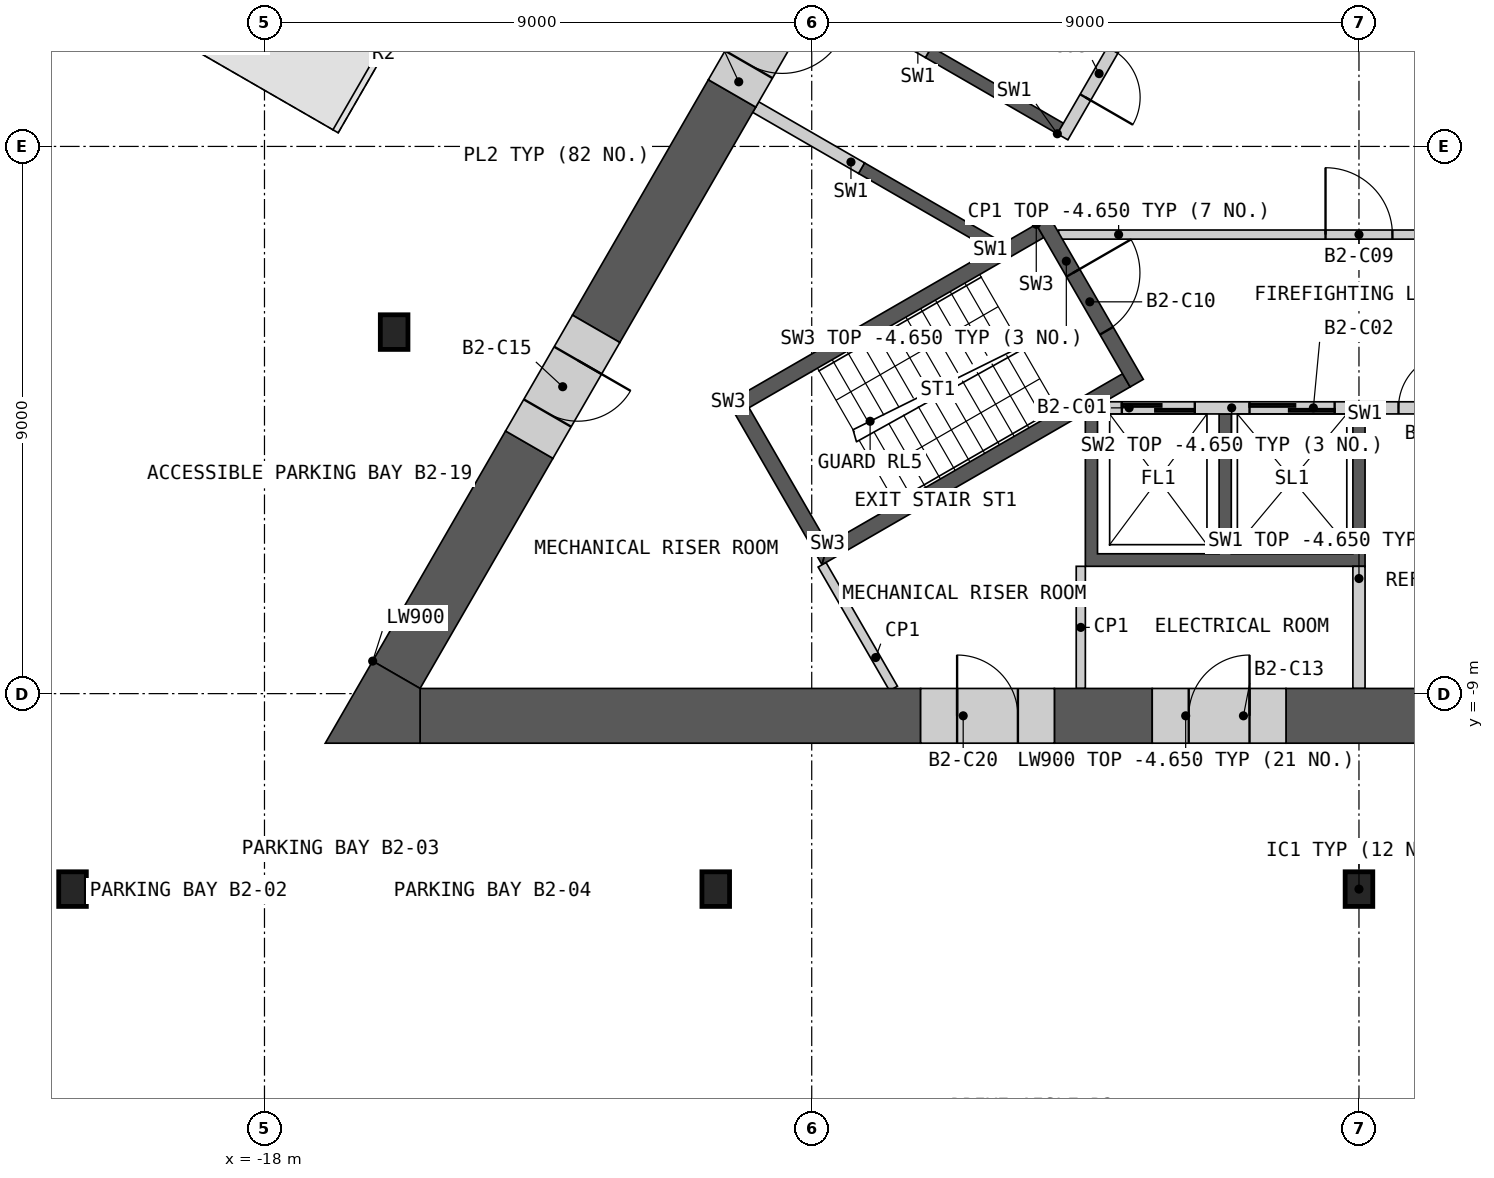
"""IFC4 building model, lengths in metres.
Left out: names, types, materials, properties, quantities, classifications, styles, units other than length and angle.
Written with IfcOpenShell. Run it as: python <this file> out.ifc"""

import sys

from ifc_helpers import new_model, si_unit, direction, frame, frame_2d, origin, origin_2d, place, context, subcontext, project, spatial, polyline, rectangle, i_section, outline, extrude, element, fill, save


model = new_model("IFC4")
c1 = context("Model", 3, precision=1e-05, world=origin(), true_north=direction((0.0, 1.0)))
c2 = subcontext(c1, "Body", "Model", "MODEL_VIEW")
j1 = project(units=[si_unit("LENGTHUNIT", "METRE"), si_unit("PLANEANGLEUNIT", "RADIAN")], contexts=[c1])
p1 = place(None, origin())
s1 = spatial("IfcSite", under=j1, at=p1, CompositionType="ELEMENT")
p2 = place(p1, origin())
s2 = spatial("IfcBuilding", under=s1, at=p2, CompositionType="ELEMENT")
p3 = place(p2, frame((0.0, 0.0, -8.4)))
s3 = spatial("IfcBuildingStorey", under=s2, at=p3, CompositionType="ELEMENT", Elevation=-8.4)
p4 = place(p3, frame((-6.74, 32.759, 0.0), z_axis=(0.0, 0.0, 1.0), x_axis=(-0.500000005698, -0.866025400495, 0.0)))
e1 = element("IfcWall", 1, at=p4, inside=s3, PredefinedType="SOLIDWALL", context=c2, shape_type="SweptSolid", body=[
    extrude(rectangle(XDim=50.0, YDim=0.6, at=frame_2d((25.0, 0.0))), origin(), (0.0, 0.0, 1.0), 3.75),
])
for number, where, z_axis, x_axis in (
    (2, (-15.868, -3.054, 0.0), (0.0, 0.0, 1.0), (1.0, 0.0, 0.0)),
    (3, (-21.157, -12.215, 0.0), (0.0, 0.0, 1.0), (1.0, 0.0, 0.0)),
    (4, (-10.578, -12.215, 0.0), (0.0, 0.0, 1.0), (1.0, 0.0, 0.0)),
    (5, (0.0, -12.215, 0.0), (0.0, 0.0, 1.0), (1.0, 0.0, 0.0)),
):
    element("IfcColumn", number, at=place(p3, frame(where, z_axis=z_axis, x_axis=x_axis)), inside=s3, PredefinedType="COLUMN", context=c2, shape_type="SweptSolid", body=[
        extrude(i_section(OverallWidth=0.454, OverallDepth=0.57, WebThickness=0.078, FlangeThickness=0.125, at=origin_2d()), origin(), (0.0, 0.0, 1.0), 4.2),
    ])
p5 = place(p3, origin())
e6 = element("IfcWall", 6, at=p5, inside=s3, PredefinedType="SHEAR", context=c2, shape_type="SweptSolid", body=[
    extrude(outline(polyline([(0.1, -4.4), (0.1, -6.906), (-4.5, -6.906), (-4.5, -4.4), (-4.3, -4.4), (-4.3, -6.7), (-2.3, -6.7), (-2.3, -4.4), (-2.1, -4.4), (-2.1, -6.7), (-0.1, -6.7), (-0.1, -4.4), (0.1, -4.4)])), origin(), (0.0, 0.0, 1.0), 3.75),
])
p6 = place(p3, frame((-4.187, -4.3, 0.0), z_axis=(0.0, 0.0, 1.0), x_axis=(1.0, 0.0, 0.0)))
e7 = element("IfcWall", 7, at=p6, inside=s3, PredefinedType="SOLIDWALL", context=c2, shape_type="SweptSolid", body=[
    extrude(rectangle(XDim=8.373, YDim=0.2, at=frame_2d((4.187, 0.0))), origin(), (0.0, 0.0, 1.0), 3.75),
])
p7 = place(p6, frame((0.287, 0.0, 0.0)))
e8 = element("IfcOpeningElement", 8, at=p7, cuts=e7, PredefinedType="OPENING", context=c2, shape_type="SweptSolid", body=[
    extrude(rectangle(XDim=1.2, YDim=2.1, at=frame_2d((0.6, 1.05))), frame((0.0, 0.11, 0.0), z_axis=(0.0, -1.0, 0.0), x_axis=(1.0, 0.0, 0.0)), (0.0, 0.0, 1.0), 0.22),
])
p8 = place(p6, frame((2.387, 0.0, 0.0)))
e9 = element("IfcOpeningElement", 9, at=p8, cuts=e7, PredefinedType="OPENING", context=c2, shape_type="SweptSolid", body=[
    extrude(rectangle(XDim=1.4, YDim=2.1, at=frame_2d((0.7, 1.05))), frame((0.0, 0.11, 0.0), z_axis=(0.0, -1.0, 0.0), x_axis=(1.0, 0.0, 0.0)), (0.0, 0.0, 1.0), 0.22),
])
p9 = place(p6, frame((4.837, 0.0, 0.0)))
e10 = element("IfcOpeningElement", 10, at=p9, cuts=e7, PredefinedType="OPENING", context=c2, shape_type="SweptSolid", body=[
    extrude(rectangle(XDim=0.9, YDim=2.1, at=frame_2d((0.45, 1.05))), frame((0.0, 0.11, 0.0), z_axis=(0.0, -1.0, 0.0), x_axis=(1.0, 0.0, 0.0)), (0.0, 0.0, 1.0), 0.22),
])
p10 = place(p6, frame((6.887, 0.0, 0.0)))
e11 = element("IfcOpeningElement", 11, at=p10, cuts=e7, PredefinedType="OPENING", context=c2, shape_type="SweptSolid", body=[
    extrude(rectangle(XDim=1.2, YDim=2.1, at=frame_2d((0.6, 1.05))), frame((0.0, 0.11, 0.0), z_axis=(0.0, -1.0, 0.0), x_axis=(1.0, 0.0, 0.0)), (0.0, 0.0, 1.0), 0.22),
])
p11 = place(p3, frame((0.0, -6.906, 0.0), z_axis=(0.0, 0.0, 1.0), x_axis=(0.0, -1.0, 0.0)))
e12 = element("IfcWall", 12, at=p11, inside=s3, PredefinedType="SHEAR", context=c2, shape_type="SweptSolid", body=[
    extrude(rectangle(XDim=2.009, YDim=0.2, at=frame_2d((1.004, 0.0))), origin(), (0.0, 0.0, 1.0), 3.75),
])
p12 = place(p3, origin())
e13 = element("IfcWall", 13, at=p12, inside=s3, PredefinedType="SHEAR", context=c2, shape_type="SweptSolid", body=[
    extrude(outline(polyline([(-6.061, -1.697), (-8.231, -0.444), (-8.131, -0.271), (-5.96, -1.524), (-6.061, -1.697)])), origin(), (0.0, 0.0, 1.0), 3.75),
])
p13 = place(p3, origin())
e14 = element("IfcWall", 14, at=p13, inside=s3, PredefinedType="SHEAR", context=c2, shape_type="SweptSolid", body=[
    extrude(outline(polyline([(-4.96, 0.208), (-7.131, 1.461), (-7.031, 1.634), (-4.861, 0.381), (-4.96, 0.208)])), origin(), (0.0, 0.0, 1.0), 3.75),
])
p14 = place(p3, frame((-1.631, 5.776, 0.0), z_axis=(0.0, 0.0, 1.0), x_axis=(-0.499992876559, -0.866029516466, 0.0)))
e15 = element("IfcWall", 15, at=p14, inside=s3, PredefinedType="SOLIDWALL", context=c2, shape_type="SweptSolid", body=[
    extrude(rectangle(XDim=6.486, YDim=0.2, at=frame_2d((3.243, 0.0))), origin(), (0.0, 0.0, 1.0), 3.75),
])
p15 = place(p14, frame((1.537, 0.0, 0.0)))
e16 = element("IfcOpeningElement", 16, at=p15, cuts=e15, PredefinedType="OPENING", context=c2, shape_type="SweptSolid", body=[
    extrude(rectangle(XDim=0.9, YDim=2.1, at=frame_2d((0.45, 1.05))), frame((0.0, 0.11, 0.0), z_axis=(0.0, -1.0, 0.0), x_axis=(1.0, 0.0, 0.0)), (0.0, 0.0, 1.0), 0.22),
])
p16 = place(p14, frame((4.837, 0.0, 0.0)))
e17 = element("IfcOpeningElement", 17, at=p16, cuts=e15, PredefinedType="OPENING", context=c2, shape_type="SweptSolid", body=[
    extrude(rectangle(XDim=0.9, YDim=2.1, at=frame_2d((0.45, 1.05))), frame((0.0, 0.11, 0.0), z_axis=(0.0, -1.0, 0.0), x_axis=(1.0, 0.0, 0.0)), (0.0, 0.0, 1.0), 0.22),
])
p17 = place(p3, frame((-7.081, 1.548, 0.0), z_axis=(0.0, 0.0, 1.0), x_axis=(-0.865983199114, 0.50007309351, 0.0)))
e18 = element("IfcWall", 18, at=p17, inside=s3, PredefinedType="SHEAR", context=c2, shape_type="SweptSolid", body=[
    extrude(rectangle(XDim=2.009, YDim=0.2, at=frame_2d((1.004, 0.0))), origin(), (0.0, 0.0, 1.0), 3.75),
])
p18 = place(p3, frame((-8.181, -0.357, 0.0), z_axis=(0.0, 0.0, 1.0), x_axis=(-0.866035824272, 0.499981950752, 0.0)))
e19 = element("IfcWall", 19, at=p18, inside=s3, PredefinedType="SHEAR", context=c2, shape_type="SweptSolid", body=[
    extrude(rectangle(XDim=2.009, YDim=0.2, at=frame_2d((1.004, 0.0))), origin(), (0.0, 0.0, 1.0), 3.75),
])
p19 = place(p3, frame((-4.941, -1.45, 0.0), z_axis=(0.0, 0.0, 1.0), x_axis=(1.0, 0.0, 0.0)))
e20 = element("IfcWall", 20, at=p19, inside=s3, PredefinedType="PARTITIONING", context=c2, shape_type="SweptSolid", body=[
    extrude(rectangle(XDim=9.882, YDim=0.15, at=frame_2d((4.941, 0.0))), origin(), (0.0, 0.0, 1.0), 3.75),
])
p20 = place(p19, frame((4.391, 0.0, 0.0)))
e21 = element("IfcOpeningElement", 21, at=p20, cuts=e20, PredefinedType="OPENING", context=c2, shape_type="SweptSolid", body=[
    extrude(rectangle(XDim=1.1, YDim=2.1, at=frame_2d((0.55, 1.05))), frame((0.0, 0.085, 0.0), z_axis=(0.0, -1.0, 0.0), x_axis=(1.0, 0.0, 0.0)), (0.0, 0.0, 1.0), 0.17),
])
p21 = place(p3, origin())
e22 = element("IfcWall", 22, at=p21, inside=s3, PredefinedType="SHEAR", context=c2, shape_type="SweptSolid", body=[
    extrude(outline(polyline([(-5.307, -1.281), (-10.374, -4.206), (-10.032, -4.298), (-5.182, -1.498), (-5.307, -1.281)])), origin(), (0.0, 0.0, 1.0), 3.75),
])
p22 = place(p3, origin())
e23 = element("IfcWall", 23, at=p22, inside=s3, PredefinedType="SHEAR", context=c2, shape_type="SweptSolid", body=[
    extrude(outline(polyline([(-10.374, -4.206), (-8.83, -6.881), (-8.738, -6.539), (-10.032, -4.298), (-10.374, -4.206)])), origin(), (0.0, 0.0, 1.0), 3.75),
])
p23 = place(p3, origin())
e24 = element("IfcWall", 24, at=p23, inside=s3, PredefinedType="SHEAR", context=c2, shape_type="SweptSolid", body=[
    extrude(outline(polyline([(-8.738, -6.539), (-8.83, -6.881), (-3.763, -3.956), (-3.888, -3.739), (-8.738, -6.539)])), origin(), (0.0, 0.0, 1.0), 3.75),
])
p24 = place(p3, frame((-5.199, -1.219, 0.0), z_axis=(0.0, 0.0, 1.0), x_axis=(0.499982516597, -0.866035497597, 0.0)))
e25 = element("IfcWall", 25, at=p24, inside=s3, PredefinedType="SHEAR", context=c2, shape_type="SweptSolid", body=[
    extrude(rectangle(XDim=3.088, YDim=0.25, at=frame_2d((1.544, 0.0))), origin(), (0.0, 0.0, 1.0), 3.75),
])
p25 = place(p24, frame((0.994, 0.0, 0.0)))
e26 = element("IfcOpeningElement", 26, at=p25, cuts=e25, PredefinedType="OPENING", context=c2, shape_type="SweptSolid", body=[
    extrude(rectangle(XDim=1.1, YDim=2.1, at=frame_2d((0.55, 1.05))), frame((0.0, 0.135, 0.0), z_axis=(0.0, -1.0, 0.0), x_axis=(1.0, 0.0, 0.0)), (0.0, 0.0, 1.0), 0.27),
])
p26 = place(p3, frame((-4.575, -6.906, 0.0), z_axis=(0.0, 0.0, 1.0), x_axis=(0.0, -1.0, 0.0)))
e27 = element("IfcWall", 27, at=p26, inside=s3, PredefinedType="PARTITIONING", context=c2, shape_type="SweptSolid", body=[
    extrude(rectangle(XDim=2.009, YDim=0.15, at=frame_2d((1.004, 0.0))), origin(), (0.0, 0.0, 1.0), 3.75),
])
p27 = place(p3, frame((-8.83, -6.881, 0.0), z_axis=(0.0, 0.0, 1.0), x_axis=(0.500073279432, -0.865983091751, 0.0)))
e28 = element("IfcWall", 28, at=p27, inside=s3, PredefinedType="PARTITIONING", context=c2, shape_type="SweptSolid", body=[
    extrude(rectangle(XDim=2.349, YDim=0.15, at=frame_2d((1.175, 0.0))), origin(), (0.0, 0.0, 1.0), 3.75),
])
p28 = place(p3, frame((-15.441, -9.365, 0.0), z_axis=(0.0, 0.0, 1.0), x_axis=(1.0, 0.0, 0.0)))
e29 = element("IfcWall", 29, at=p28, inside=s3, PredefinedType="SHEAR", context=c2, shape_type="SweptSolid", body=[
    extrude(rectangle(XDim=8.232, YDim=0.9, at=frame_2d((4.116, 0.0))), origin(), (0.0, 0.0, 1.0), 3.75),
])
p29 = place(p3, frame((-1.2, -9.365, 0.0), z_axis=(0.0, 0.0, 1.0), x_axis=(1.0, 0.0, 0.0)))
e30 = element("IfcWall", 30, at=p29, inside=s3, PredefinedType="SHEAR", context=c2, shape_type="SweptSolid", body=[
    extrude(rectangle(XDim=3.52, YDim=0.9, at=frame_2d((1.76, 0.0))), origin(), (0.0, 0.0, 1.0), 3.75),
])
p30 = place(p3, frame((-5.009, -9.365, 0.0), z_axis=(0.0, 0.0, 1.0), x_axis=(1.0, 0.0, 0.0)))
e31 = element("IfcWall", 31, at=p30, inside=s3, PredefinedType="SHEAR", context=c2, shape_type="SweptSolid", body=[
    extrude(rectangle(XDim=1.609, YDim=0.9, at=frame_2d((0.805, 0.0))), origin(), (0.0, 0.0, 1.0), 3.75),
])
p31 = place(p3, frame((-10.31, 0.872, 0.0), z_axis=(0.0, 0.0, 1.0), x_axis=(-0.499991893987, -0.866030083742, 0.0)))
e32 = element("IfcWall", 32, at=p31, inside=s3, PredefinedType="SHEAR", context=c2, shape_type="SweptSolid", body=[
    extrude(rectangle(XDim=4.471, YDim=0.9, at=frame_2d((2.235, 0.0))), origin(), (0.0, 0.0, 1.0), 3.75),
])
p32 = place(p3, frame((-13.646, -4.905, 0.0), z_axis=(0.0, 0.0, 1.0), x_axis=(-0.499990005186, -0.866031174216, 0.0)))
e33 = element("IfcWall", 33, at=p32, inside=s3, PredefinedType="SHEAR", context=c2, shape_type="SweptSolid", body=[
    extrude(rectangle(XDim=4.371, YDim=0.9, at=frame_2d((2.185, 0.0))), origin(), (0.0, 0.0, 1.0), 3.75),
])
p33 = place(p3, origin())
e34 = element("IfcWall", 34, at=p33, inside=s3, PredefinedType="SHEAR", context=c2, shape_type="SweptSolid", body=[
    extrude(outline(polyline([(-16.221, -8.465), (-15.441, -8.915), (-15.441, -9.815), (-17.0, -9.815), (-16.221, -8.465)])), origin(), (0.0, 0.0, 1.0), 3.75),
])
p34 = place(p3, frame((-3.4, -9.365, 0.0), z_axis=(0.0, 0.0, 1.0), x_axis=(1.0, 0.0, 0.0)))
e35 = element("IfcWall", 35, at=p34, inside=s3, PredefinedType="SHEAR", context=c2, shape_type="SweptSolid", body=[
    extrude(rectangle(XDim=2.2, YDim=0.9, at=frame_2d((1.1, 0.0))), origin(), (0.0, 0.0, 1.0), 3.75),
])
p35 = place(p34, frame((0.6, 0.0, 0.0)))
e36 = element("IfcOpeningElement", 36, at=p35, cuts=e35, PredefinedType="OPENING", context=c2, shape_type="SweptSolid", body=[
    extrude(rectangle(XDim=1.0, YDim=2.1, at=frame_2d((0.5, 1.05))), frame((0.0, 0.46, 0.0), z_axis=(0.0, -1.0, 0.0), x_axis=(1.0, 0.0, 0.0)), (0.0, 0.0, 1.0), 0.92),
])
p36 = place(p3, frame((-12.546, -3.0, 0.0), z_axis=(0.0, 0.0, 1.0), x_axis=(-0.499994660107, -0.866028486751, 0.0)))
e37 = element("IfcWall", 37, at=p36, inside=s3, PredefinedType="SHEAR", context=c2, shape_type="SweptSolid", body=[
    extrude(rectangle(XDim=2.2, YDim=0.9, at=frame_2d((1.1, 0.0))), origin(), (0.0, 0.0, 1.0), 3.75),
])
p37 = place(p36, frame((0.6, 0.0, 0.0)))
e38 = element("IfcOpeningElement", 38, at=p37, cuts=e37, PredefinedType="OPENING", context=c2, shape_type="SweptSolid", body=[
    extrude(rectangle(XDim=1.0, YDim=2.1, at=frame_2d((0.5, 1.05))), frame((0.0, 0.46, 0.0), z_axis=(0.0, -1.0, 0.0), x_axis=(1.0, 0.0, 0.0)), (0.0, 0.0, 1.0), 0.92),
])
p38 = place(p3, frame((-7.209, -9.365, 0.0), z_axis=(0.0, 0.0, 1.0), x_axis=(1.0, 0.0, 0.0)))
e39 = element("IfcWall", 39, at=p38, inside=s3, PredefinedType="SHEAR", context=c2, shape_type="SweptSolid", body=[
    extrude(rectangle(XDim=2.2, YDim=0.9, at=frame_2d((1.1, 0.0))), origin(), (0.0, 0.0, 1.0), 3.75),
])
p39 = place(p38, frame((0.6, 0.0, 0.0)))
e40 = element("IfcOpeningElement", 40, at=p39, cuts=e39, PredefinedType="OPENING", context=c2, shape_type="SweptSolid", body=[
    extrude(rectangle(XDim=1.0, YDim=2.1, at=frame_2d((0.5, 1.05))), frame((0.0, 0.46, 0.0), z_axis=(0.0, -1.0, 0.0), x_axis=(1.0, 0.0, 0.0)), (0.0, 0.0, 1.0), 0.92),
])
p40 = place(p3, frame((-9.21, 2.777, 0.0), z_axis=(0.0, 0.0, 1.0), x_axis=(-0.500077893725, -0.86598042715, 0.0)))
e41 = element("IfcWall", 41, at=p40, inside=s3, PredefinedType="SHEAR", context=c2, shape_type="SweptSolid", body=[
    extrude(rectangle(XDim=2.2, YDim=0.9, at=frame_2d((1.1, 0.0))), origin(), (0.0, 0.0, 1.0), 3.75),
])
p41 = place(p40, frame((0.55, 0.0, 0.0)))
e42 = element("IfcOpeningElement", 42, at=p41, cuts=e41, PredefinedType="OPENING", context=c2, shape_type="SweptSolid", body=[
    extrude(rectangle(XDim=1.1, YDim=2.1, at=frame_2d((0.55, 1.05))), frame((0.0, 0.46, 0.0), z_axis=(0.0, -1.0, 0.0), x_axis=(1.0, 0.0, 0.0)), (0.0, 0.0, 1.0), 0.92),
])
p42 = place(p7, origin())
e43 = element("IfcDoor", 43, at=p42, inside=s3, OperationType="SLIDING_TO_LEFT", PredefinedType="DOOR", context=c2, shape_type="SweptSolid", body=[
    extrude(rectangle(XDim=1.2, YDim=2.1, at=frame_2d((0.6, 1.05))), frame((0.0, 0.025, 0.0), z_axis=(0.0, -1.0, 0.0), x_axis=(1.0, 0.0, 0.0)), (0.0, 0.0, 1.0), 0.05),
])
fill(e8, e43)
p43 = place(p8, origin())
e44 = element("IfcDoor", 44, at=p43, inside=s3, OperationType="SLIDING_TO_LEFT", PredefinedType="DOOR", context=c2, shape_type="SweptSolid", body=[
    extrude(rectangle(XDim=1.4, YDim=2.1, at=frame_2d((0.7, 1.05))), frame((0.0, 0.025, 0.0), z_axis=(0.0, -1.0, 0.0), x_axis=(1.0, 0.0, 0.0)), (0.0, 0.0, 1.0), 0.05),
])
fill(e9, e44)
p44 = place(p9, origin())
e45 = element("IfcDoor", 45, at=p44, inside=s3, OperationType="SINGLE_SWING_RIGHT", PredefinedType="DOOR", context=c2, shape_type="SweptSolid", body=[
    extrude(rectangle(XDim=0.9, YDim=2.1, at=frame_2d((0.45, 1.05))), frame((0.0, 0.025, 0.0), z_axis=(0.0, -1.0, 0.0), x_axis=(1.0, 0.0, 0.0)), (0.0, 0.0, 1.0), 0.05),
])
fill(e10, e45)
p45 = place(p16, origin())
e46 = element("IfcDoor", 46, at=p45, inside=s3, OperationType="SINGLE_SWING_RIGHT", PredefinedType="DOOR", context=c2, shape_type="SweptSolid", body=[
    extrude(rectangle(XDim=0.9, YDim=2.1, at=frame_2d((0.45, 1.05))), frame((0.0, 0.025, 0.0), z_axis=(0.0, -1.0, 0.0), x_axis=(1.0, 0.0, 0.0)), (0.0, 0.0, 1.0), 0.05),
])
fill(e17, e46)
p46 = place(p20, origin())
e47 = element("IfcDoor", 47, at=p46, inside=s3, OperationType="SINGLE_SWING_LEFT", PredefinedType="DOOR", context=c2, shape_type="SweptSolid", body=[
    extrude(rectangle(XDim=1.1, YDim=2.1, at=frame_2d((0.55, 1.05))), frame((0.0, 0.025, 0.0), z_axis=(0.0, -1.0, 0.0), x_axis=(1.0, 0.0, 0.0)), (0.0, 0.0, 1.0), 0.05),
])
fill(e21, e47)
p47 = place(p25, origin())
e48 = element("IfcDoor", 48, at=p47, inside=s3, OperationType="SINGLE_SWING_LEFT", PredefinedType="DOOR", context=c2, shape_type="SweptSolid", body=[
    extrude(rectangle(XDim=1.1, YDim=2.1, at=frame_2d((0.55, 1.05))), frame((0.0, 0.025, 0.0), z_axis=(0.0, -1.0, 0.0), x_axis=(1.0, 0.0, 0.0)), (0.0, 0.0, 1.0), 0.05),
])
fill(e26, e48)
p48 = place(p35, origin())
e49 = element("IfcDoor", 49, at=p48, inside=s3, OperationType="SINGLE_SWING_RIGHT", PredefinedType="DOOR", context=c2, shape_type="SweptSolid", body=[
    extrude(rectangle(XDim=1.0, YDim=2.1, at=frame_2d((0.5, 1.05))), frame((0.0, 0.205, 0.0), z_axis=(0.0, -1.0, 0.0), x_axis=(1.0, 0.0, 0.0)), (0.0, 0.0, 1.0), 0.05),
])
fill(e36, e49)
p49 = place(p37, origin())
e50 = element("IfcDoor", 50, at=p49, inside=s3, OperationType="SINGLE_SWING_LEFT", PredefinedType="DOOR", context=c2, shape_type="SweptSolid", body=[
    extrude(rectangle(XDim=1.0, YDim=2.1, at=frame_2d((0.5, 1.05))), frame((0.0, 0.205, 0.0), z_axis=(0.0, -1.0, 0.0), x_axis=(1.0, 0.0, 0.0)), (0.0, 0.0, 1.0), 0.05),
])
fill(e38, e50)
p50 = place(p39, origin())
e51 = element("IfcDoor", 51, at=p50, inside=s3, OperationType="SINGLE_SWING_LEFT", PredefinedType="DOOR", context=c2, shape_type="SweptSolid", body=[
    extrude(rectangle(XDim=1.0, YDim=2.1, at=frame_2d((0.5, 1.05))), frame((0.0, 0.205, 0.0), z_axis=(0.0, -1.0, 0.0), x_axis=(1.0, 0.0, 0.0)), (0.0, 0.0, 1.0), 0.05),
])
fill(e40, e51)
p51 = place(p41, origin())
e52 = element("IfcDoor", 52, at=p51, inside=s3, OperationType="SINGLE_SWING_LEFT", PredefinedType="DOOR", context=c2, shape_type="SweptSolid", body=[
    extrude(rectangle(XDim=1.1, YDim=2.1, at=frame_2d((0.55, 1.05))), frame((0.0, 0.205, 0.0), z_axis=(0.0, -1.0, 0.0), x_axis=(1.0, 0.0, 0.0)), (0.0, 0.0, 1.0), 0.05),
])
fill(e42, e52)
save(model, sys.argv[1])
